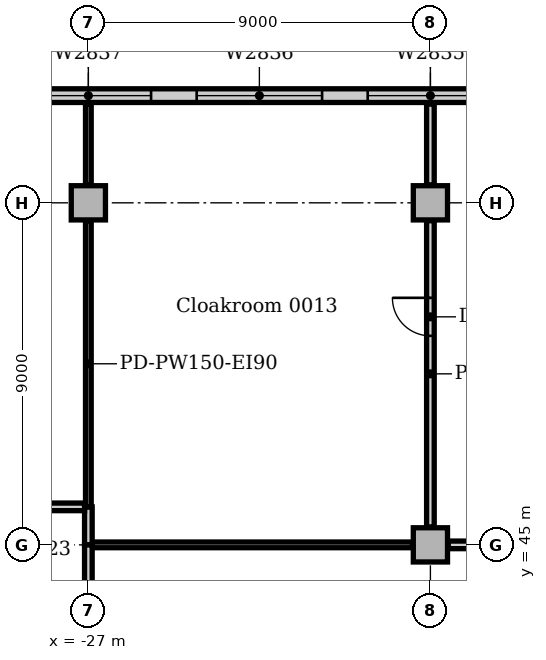
"""IFC4 building model, lengths in metres.
Left out: names, types, materials, properties, quantities, classifications, styles, units other than length and angle.
Written with IfcOpenShell. Run it as: python <this file> out.ifc"""

import sys

from ifc_helpers import new_model, si_unit, direction, frame, frame_2d, origin, origin_2d, place, context, subcontext, project, spatial, rectangle, extrude, element, fill, save


model = new_model("IFC4")
c1 = context("Model", 3, precision=1e-05, world=origin(), true_north=direction((0.0, 1.0)))
c2 = subcontext(c1, "Body", "Model", "MODEL_VIEW")
j1 = project(units=[si_unit("LENGTHUNIT", "METRE"), si_unit("PLANEANGLEUNIT", "RADIAN")], contexts=[c1])
p1 = place(None, origin())
s1 = spatial("IfcSite", under=j1, at=p1, CompositionType="ELEMENT")
p2 = place(p1, origin())
s2 = spatial("IfcBuilding", under=s1, at=p2, CompositionType="ELEMENT")
p3 = place(p2, origin())
s3 = spatial("IfcBuildingStorey", under=s2, at=p3, CompositionType="ELEMENT", Elevation=0.0)
for number, where, z_axis, x_axis in (
    (1, (-27.0, 54.0, 0.0), (0.0, 0.0, 1.0), (1.0, 0.0, 0.0)),
    (2, (-18.0, 45.0, 0.0), (0.0, 0.0, 1.0), (1.0, 0.0, 0.0)),
    (3, (-18.0, 54.0, 0.0), (0.0, 0.0, 1.0), (1.0, 0.0, 0.0)),
):
    element("IfcColumn", number, at=place(p3, frame(where, z_axis=z_axis, x_axis=x_axis)), inside=s3, PredefinedType="COLUMN", context=c2, shape_type="SweptSolid", body=[
        extrude(rectangle(XDim=0.9, YDim=0.9, at=origin_2d()), origin(), (0.0, 0.0, 1.0), 5.7),
    ])
p4 = place(p3, frame((3.4, 56.82, 0.0), z_axis=(0.0, 0.0, 1.0), x_axis=(-1.0, 0.0, 0.0)))
e4 = element("IfcWall", 4, at=p4, inside=s3, PredefinedType="STANDARD", context=c2, shape_type="SweptSolid", body=[
    extrude(rectangle(XDim=84.4, YDim=0.36, at=frame_2d((42.2, 0.0))), origin(), (0.0, 0.0, 1.0), 5.7),
])
p5 = place(p4, frame((15.7, 0.0, 0.0)))
e5 = element("IfcOpeningElement", 5, at=p5, cuts=e4, PredefinedType="OPENING", context=c2, shape_type="SweptSolid", body=[
    extrude(rectangle(XDim=2.4, YDim=2.4, at=frame_2d((1.2, 1.2))), frame((0.0, 0.19, 0.0), z_axis=(0.0, -1.0, 0.0), x_axis=(1.0, 0.0, 0.0)), (0.0, 0.0, 1.0), 0.38),
])
p6 = place(p4, frame((76.6, 0.0, 0.0)))
e6 = element("IfcOpeningElement", 6, at=p6, cuts=e4, PredefinedType="OPENING", context=c2, shape_type="SweptSolid", body=[
    extrude(rectangle(XDim=6.6, YDim=4.2, at=frame_2d((3.3, 2.1))), frame((0.0, 0.19, 0.0), z_axis=(0.0, -1.0, 0.0), x_axis=(1.0, 0.0, 0.0)), (0.0, 0.0, 1.0), 0.38),
])
p7 = place(p4, frame((59.65, 0.0, 0.0)))
e7 = element("IfcOpeningElement", 7, at=p7, cuts=e4, PredefinedType="OPENING", context=c2, shape_type="SweptSolid", body=[
    extrude(rectangle(XDim=4.5, YDim=4.2, at=frame_2d((2.25, 2.1))), frame((0.0, 0.19, 0.0), z_axis=(0.0, -1.0, 0.0), x_axis=(1.0, 0.0, 0.0)), (0.0, 0.0, 1.0), 0.38),
])
p8 = place(p4, frame((58.3, 0.0, 0.0)))
e8 = element("IfcOpeningElement", 8, at=p8, cuts=e4, PredefinedType="OPENING", context=c2, shape_type="SweptSolid", body=[
    extrude(rectangle(XDim=1.2, YDim=2.2, at=frame_2d((0.6, 1.1))), frame((0.0, 0.19, 0.0), z_axis=(0.0, -1.0, 0.0), x_axis=(1.0, 0.0, 0.0)), (0.0, 0.0, 1.0), 0.38),
])
p9 = place(p4, frame((70.0, 0.0, 0.0)))
e9 = element("IfcOpeningElement", 9, at=p9, cuts=e4, PredefinedType="OPENING", context=c2, shape_type="SweptSolid", body=[
    extrude(rectangle(XDim=1.8, YDim=2.2, at=frame_2d((0.9, 1.1))), frame((0.0, 0.19, 0.0), z_axis=(0.0, -1.0, 0.0), x_axis=(1.0, 0.0, 0.0)), (0.0, 0.0, 1.0), 0.38),
])
p10 = place(p4, frame((52.0, 0.0, 0.0)))
e10 = element("IfcOpeningElement", 10, at=p10, cuts=e4, PredefinedType="OPENING", context=c2, shape_type="SweptSolid", body=[
    extrude(rectangle(XDim=1.8, YDim=2.2, at=frame_2d((0.9, 1.1))), frame((0.0, 0.19, 0.0), z_axis=(0.0, -1.0, 0.0), x_axis=(1.0, 0.0, 0.0)), (0.0, 0.0, 1.0), 0.38),
])
p11 = place(p4, frame((1.75, 0.0, 0.6)))
e11 = element("IfcOpeningElement", 11, at=p11, cuts=e4, PredefinedType="OPENING", context=c2, shape_type="SweptSolid", body=[
    extrude(rectangle(XDim=3.3, YDim=3.0, at=frame_2d((1.65, 1.5))), frame((0.0, 0.19, 0.0), z_axis=(0.0, -1.0, 0.0), x_axis=(1.0, 0.0, 0.0)), (0.0, 0.0, 1.0), 0.38),
])
p12 = place(p4, frame((6.25, 0.0, 0.6)))
e12 = element("IfcOpeningElement", 12, at=p12, cuts=e4, PredefinedType="OPENING", context=c2, shape_type="SweptSolid", body=[
    extrude(rectangle(XDim=3.3, YDim=3.0, at=frame_2d((1.65, 1.5))), frame((0.0, 0.19, 0.0), z_axis=(0.0, -1.0, 0.0), x_axis=(1.0, 0.0, 0.0)), (0.0, 0.0, 1.0), 0.38),
])
p13 = place(p4, frame((10.75, 0.0, 0.6)))
e13 = element("IfcOpeningElement", 13, at=p13, cuts=e4, PredefinedType="OPENING", context=c2, shape_type="SweptSolid", body=[
    extrude(rectangle(XDim=3.3, YDim=3.0, at=frame_2d((1.65, 1.5))), frame((0.0, 0.19, 0.0), z_axis=(0.0, -1.0, 0.0), x_axis=(1.0, 0.0, 0.0)), (0.0, 0.0, 1.0), 0.38),
])
p14 = place(p4, frame((19.75, 0.0, 0.6)))
e14 = element("IfcOpeningElement", 14, at=p14, cuts=e4, PredefinedType="OPENING", context=c2, shape_type="SweptSolid", body=[
    extrude(rectangle(XDim=3.3, YDim=3.0, at=frame_2d((1.65, 1.5))), frame((0.0, 0.19, 0.0), z_axis=(0.0, -1.0, 0.0), x_axis=(1.0, 0.0, 0.0)), (0.0, 0.0, 1.0), 0.38),
])
p15 = place(p4, frame((24.25, 0.0, 0.6)))
e15 = element("IfcOpeningElement", 15, at=p15, cuts=e4, PredefinedType="OPENING", context=c2, shape_type="SweptSolid", body=[
    extrude(rectangle(XDim=3.3, YDim=3.0, at=frame_2d((1.65, 1.5))), frame((0.0, 0.19, 0.0), z_axis=(0.0, -1.0, 0.0), x_axis=(1.0, 0.0, 0.0)), (0.0, 0.0, 1.0), 0.38),
])
p16 = place(p4, frame((28.75, 0.0, 0.6)))
e16 = element("IfcOpeningElement", 16, at=p16, cuts=e4, PredefinedType="OPENING", context=c2, shape_type="SweptSolid", body=[
    extrude(rectangle(XDim=3.3, YDim=3.0, at=frame_2d((1.65, 1.5))), frame((0.0, 0.19, 0.0), z_axis=(0.0, -1.0, 0.0), x_axis=(1.0, 0.0, 0.0)), (0.0, 0.0, 1.0), 0.38),
])
p17 = place(p4, frame((33.25, 0.0, 0.6)))
e17 = element("IfcOpeningElement", 17, at=p17, cuts=e4, PredefinedType="OPENING", context=c2, shape_type="SweptSolid", body=[
    extrude(rectangle(XDim=3.3, YDim=3.0, at=frame_2d((1.65, 1.5))), frame((0.0, 0.19, 0.0), z_axis=(0.0, -1.0, 0.0), x_axis=(1.0, 0.0, 0.0)), (0.0, 0.0, 1.0), 0.38),
])
p18 = place(p4, frame((37.75, 0.0, 0.6)))
e18 = element("IfcOpeningElement", 18, at=p18, cuts=e4, PredefinedType="OPENING", context=c2, shape_type="SweptSolid", body=[
    extrude(rectangle(XDim=3.3, YDim=3.0, at=frame_2d((1.65, 1.5))), frame((0.0, 0.19, 0.0), z_axis=(0.0, -1.0, 0.0), x_axis=(1.0, 0.0, 0.0)), (0.0, 0.0, 1.0), 0.38),
])
p19 = place(p4, frame((42.25, 0.0, 0.6)))
e19 = element("IfcOpeningElement", 19, at=p19, cuts=e4, PredefinedType="OPENING", context=c2, shape_type="SweptSolid", body=[
    extrude(rectangle(XDim=3.3, YDim=3.0, at=frame_2d((1.65, 1.5))), frame((0.0, 0.19, 0.0), z_axis=(0.0, -1.0, 0.0), x_axis=(1.0, 0.0, 0.0)), (0.0, 0.0, 1.0), 0.38),
])
p20 = place(p4, frame((46.75, 0.0, 0.6)))
e20 = element("IfcOpeningElement", 20, at=p20, cuts=e4, PredefinedType="OPENING", context=c2, shape_type="SweptSolid", body=[
    extrude(rectangle(XDim=3.3, YDim=3.0, at=frame_2d((1.65, 1.5))), frame((0.0, 0.19, 0.0), z_axis=(0.0, -1.0, 0.0), x_axis=(1.0, 0.0, 0.0)), (0.0, 0.0, 1.0), 0.38),
])
p21 = place(p3, frame((-26.9, 45.0, 0.0), z_axis=(0.0, 0.0, 1.0), x_axis=(1.0, 0.0, 0.0)))
e21 = element("IfcWall", 21, at=p21, inside=s3, PredefinedType="PARTITIONING", context=c2, shape_type="SweptSolid", body=[
    extrude(rectangle(XDim=8.43, YDim=0.15, at=frame_2d((4.215, 0.0))), origin(), (0.0, 0.0, 1.0), 5.7),
])
p22 = place(p3, frame((-18.0, 45.47, 0.0), z_axis=(0.0, 0.0, 1.0), x_axis=(0.0, 1.0, 0.0)))
e22 = element("IfcWall", 22, at=p22, inside=s3, PredefinedType="PARTITIONING", context=c2, shape_type="SweptSolid", body=[
    extrude(rectangle(XDim=8.06, YDim=0.2, at=frame_2d((4.03, 0.0))), origin(), (0.0, 0.0, 1.0), 5.7),
])
p23 = place(p22, frame((5.03, 0.0, 0.0)))
e23 = element("IfcOpeningElement", 23, at=p23, cuts=e22, PredefinedType="OPENING", context=c2, shape_type="SweptSolid", body=[
    extrude(rectangle(XDim=1.0, YDim=2.1, at=frame_2d((0.5, 1.05))), frame((0.0, 0.11, 0.0), z_axis=(0.0, -1.0, 0.0), x_axis=(1.0, 0.0, 0.0)), (0.0, 0.0, 1.0), 0.22),
])
p24 = place(p3, frame((-18.0, 54.47, 0.0), z_axis=(0.0, 0.0, 1.0), x_axis=(0.0, 1.0, 0.0)))
e24 = element("IfcWall", 24, at=p24, inside=s3, PredefinedType="PARTITIONING", context=c2, shape_type="SweptSolid", body=[
    extrude(rectangle(XDim=2.13, YDim=0.2, at=frame_2d((1.065, 0.0))), origin(), (0.0, 0.0, 1.0), 5.7),
])
p25 = place(p3, frame((-27.0, 45.0, 0.0), z_axis=(0.0, 0.0, 1.0), x_axis=(0.0, 1.0, 0.0)))
e25 = element("IfcWall", 25, at=p25, inside=s3, PredefinedType="PARTITIONING", context=c2, shape_type="SweptSolid", body=[
    extrude(rectangle(XDim=1.0, YDim=0.2, at=frame_2d((0.5, 0.0))), origin(), (0.0, 0.0, 1.0), 5.7),
])
p26 = place(p3, frame((-27.0, 46.0, 0.0), z_axis=(0.0, 0.0, 1.0), x_axis=(0.0, 1.0, 0.0)))
e26 = element("IfcWall", 26, at=p26, inside=s3, PredefinedType="PARTITIONING", context=c2, shape_type="SweptSolid", body=[
    extrude(rectangle(XDim=7.53, YDim=0.15, at=frame_2d((3.765, 0.0))), origin(), (0.0, 0.0, 1.0), 5.7),
])
p27 = place(p3, frame((-27.0, 54.47, 0.0), z_axis=(0.0, 0.0, 1.0), x_axis=(0.0, 1.0, 0.0)))
e27 = element("IfcWall", 27, at=p27, inside=s3, PredefinedType="PARTITIONING", context=c2, shape_type="SweptSolid", body=[
    extrude(rectangle(XDim=2.13, YDim=0.15, at=frame_2d((1.065, 0.0))), origin(), (0.0, 0.0, 1.0), 5.7),
])
p28 = place(p3, frame((-17.53, 45.0, 0.0), z_axis=(0.0, 0.0, 1.0), x_axis=(1.0, 0.0, 0.0)))
e28 = element("IfcWall", 28, at=p28, inside=s3, PredefinedType="PARTITIONING", context=c2, shape_type="SweptSolid", body=[
    extrude(rectangle(XDim=4.13, YDim=0.2, at=frame_2d((2.065, 0.0))), origin(), (0.0, 0.0, 1.0), 5.7),
])
p29 = place(p3, frame((-27.0, 42.0, 0.0), z_axis=(0.0, 0.0, 1.0), x_axis=(0.0, 1.0, 0.0)))
e29 = element("IfcWall", 29, at=p29, inside=s3, PredefinedType="PARTITIONING", context=c2, shape_type="SweptSolid", body=[
    extrude(rectangle(XDim=3.0, YDim=0.2, at=frame_2d((1.5, 0.0))), origin(), (0.0, 0.0, 1.0), 5.7),
])
p30 = place(p3, frame((-36.0, 46.0, 0.0), z_axis=(0.0, 0.0, 1.0), x_axis=(1.0, 0.0, 0.0)))
e30 = element("IfcWall", 30, at=p30, inside=s3, PredefinedType="PARTITIONING", context=c2, shape_type="SweptSolid", body=[
    extrude(rectangle(XDim=8.9, YDim=0.2, at=frame_2d((4.45, 0.0))), origin(), (0.0, 0.0, 1.0), 5.7),
])
p31 = place(p30, frame((4.0, 0.0, 0.0)))
e31 = element("IfcOpeningElement", 31, at=p31, cuts=e30, PredefinedType="OPENING", context=c2, shape_type="SweptSolid", body=[
    extrude(rectangle(XDim=1.0, YDim=2.1, at=frame_2d((0.5, 1.05))), frame((0.0, 0.11, 0.0), z_axis=(0.0, -1.0, 0.0), x_axis=(1.0, 0.0, 0.0)), (0.0, 0.0, 1.0), 0.22),
])
p32 = place(p14, origin())
e32 = element("IfcWindow", 32, at=p32, inside=s3, PartitioningType="SINGLE_PANEL", PredefinedType="WINDOW", context=c2, shape_type="SweptSolid", body=[
    extrude(rectangle(XDim=3.3, YDim=3.0, at=frame_2d((1.65, 1.5))), frame((0.0, 0.13, 0.0), z_axis=(0.0, -1.0, 0.0), x_axis=(1.0, 0.0, 0.0)), (0.0, 0.0, 1.0), 0.06),
])
fill(e14, e32)
p33 = place(p15, origin())
e33 = element("IfcWindow", 33, at=p33, inside=s3, PartitioningType="SINGLE_PANEL", PredefinedType="WINDOW", context=c2, shape_type="SweptSolid", body=[
    extrude(rectangle(XDim=3.3, YDim=3.0, at=frame_2d((1.65, 1.5))), frame((0.0, 0.13, 0.0), z_axis=(0.0, -1.0, 0.0), x_axis=(1.0, 0.0, 0.0)), (0.0, 0.0, 1.0), 0.06),
])
fill(e15, e33)
p34 = place(p16, origin())
e34 = element("IfcWindow", 34, at=p34, inside=s3, PartitioningType="SINGLE_PANEL", PredefinedType="WINDOW", context=c2, shape_type="SweptSolid", body=[
    extrude(rectangle(XDim=3.3, YDim=3.0, at=frame_2d((1.65, 1.5))), frame((0.0, 0.13, 0.0), z_axis=(0.0, -1.0, 0.0), x_axis=(1.0, 0.0, 0.0)), (0.0, 0.0, 1.0), 0.06),
])
fill(e16, e34)
p35 = place(p23, origin())
e35 = element("IfcDoor", 35, at=p35, inside=s3, OperationType="SINGLE_SWING_RIGHT", PredefinedType="DOOR", context=c2, shape_type="SweptSolid", body=[
    extrude(rectangle(XDim=1.0, YDim=2.1, at=frame_2d((0.5, 1.05))), frame((0.0, 0.025, 0.0), z_axis=(0.0, -1.0, 0.0), x_axis=(1.0, 0.0, 0.0)), (0.0, 0.0, 1.0), 0.05),
])
fill(e23, e35)
save(model, sys.argv[1])
